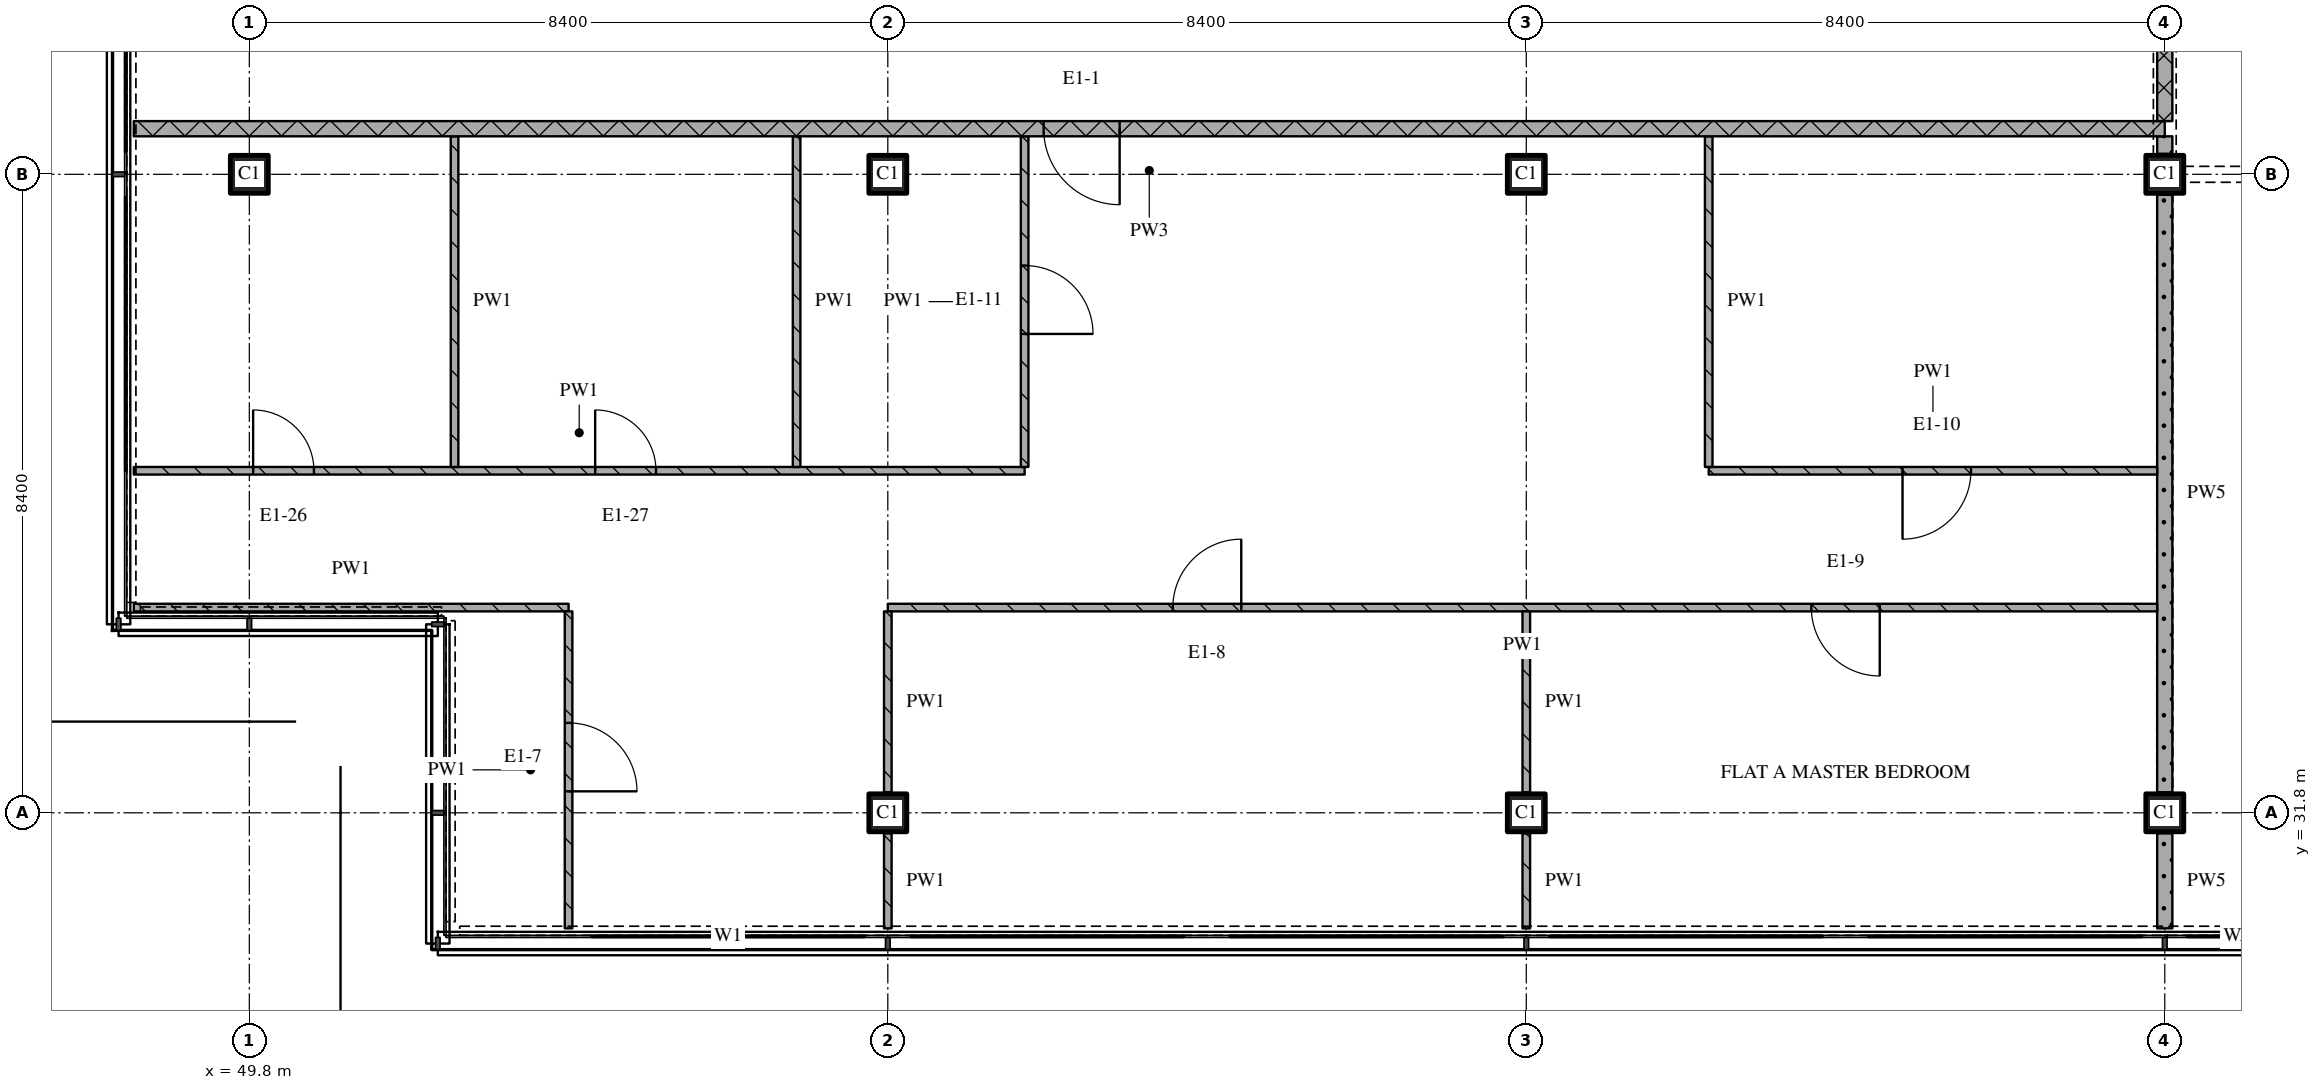
"""IFC4 building model, lengths in metres.
Left out: names, types, materials, properties, quantities, classifications, styles, units other than length and angle.
Written with IfcOpenShell. Run it as: python <this file> out.ifc"""

import sys

from ifc_helpers import new_model, si_unit, direction, frame, frame_2d, origin, origin_2d, place, context, subcontext, project, spatial, rectangle, extrude, element, fill, save


model = new_model("IFC4")
c1 = context("Model", 3, precision=1e-05, world=origin(), true_north=direction((0.0, 1.0)))
c2 = subcontext(c1, "Body", "Model", "MODEL_VIEW")
j1 = project(units=[si_unit("LENGTHUNIT", "METRE"), si_unit("PLANEANGLEUNIT", "RADIAN")], contexts=[c1])
p1 = place(None, origin())
s1 = spatial("IfcSite", under=j1, at=p1, CompositionType="ELEMENT")
p2 = place(p1, origin())
s2 = spatial("IfcBuilding", under=s1, at=p2, CompositionType="ELEMENT")
p3 = place(p2, frame((0.0, 0.0, 263.55)))
s3 = spatial("IfcBuildingStorey", under=s2, at=p3, CompositionType="ELEMENT", Elevation=263.55)
for number, where, z_axis, x_axis in (
    (1, (49.8, 40.2, 0.0), (0.0, 0.0, 1.0), (1.0, 0.0, 0.0)),
    (2, (58.2, 31.8, 0.0), (0.0, 0.0, 1.0), (1.0, 0.0, 0.0)),
    (3, (58.2, 40.2, 0.0), (0.0, 0.0, 1.0), (1.0, 0.0, 0.0)),
    (4, (66.6, 31.8, 0.0), (0.0, 0.0, 1.0), (1.0, 0.0, 0.0)),
    (5, (66.6, 40.2, 0.0), (0.0, 0.0, 1.0), (1.0, 0.0, 0.0)),
    (6, (75.0, 31.8, 0.0), (0.0, 0.0, 1.0), (1.0, 0.0, 0.0)),
    (7, (75.0, 40.2, 0.0), (0.0, 0.0, 1.0), (1.0, 0.0, 0.0)),
):
    element("IfcColumn", number, at=place(p3, frame(where, z_axis=z_axis, x_axis=x_axis)), inside=s3, PredefinedType="COLUMN", context=c2, shape_type="SweptSolid", body=[
        extrude(rectangle(XDim=0.5, YDim=0.5, at=origin_2d()), origin(), (0.0, 0.0, 1.0), 3.6),
    ])
p4 = place(p3, frame((48.28, 34.5, 0.0), z_axis=(0.0, 0.0, 1.0), x_axis=(1.0, 0.0, 0.0)))
e8 = element("IfcWall", 8, at=p4, inside=s3, PredefinedType="PARTITIONING", context=c2, shape_type="SweptSolid", body=[
    extrude(rectangle(XDim=5.72, YDim=0.1, at=frame_2d((2.86, 0.0))), origin(), (0.0, 0.0, 1.0), 3.32),
])
p5 = place(p3, frame((74.9, 34.5, 0.0), z_axis=(0.0, 0.0, 1.0), x_axis=(-1.0, 0.0, 0.0)))
e9 = element("IfcWall", 9, at=p5, inside=s3, PredefinedType="PARTITIONING", context=c2, shape_type="SweptSolid", body=[
    extrude(rectangle(XDim=16.7, YDim=0.1, at=frame_2d((8.35, 0.0))), origin(), (0.0, 0.0, 1.0), 3.32),
])
p6 = place(p5, frame((3.65, 0.0, 0.0)))
e10 = element("IfcOpeningElement", 10, at=p6, cuts=e9, PredefinedType="OPENING", context=c2, shape_type="SweptSolid", body=[
    extrude(rectangle(XDim=0.9, YDim=2.1, at=frame_2d((0.45, 1.05))), frame((0.0, 0.06, 0.0), z_axis=(0.0, -1.0, 0.0), x_axis=(1.0, 0.0, 0.0)), (0.0, 0.0, 1.0), 0.12),
])
p7 = place(p5, frame((12.05, 0.0, 0.0)))
e11 = element("IfcOpeningElement", 11, at=p7, cuts=e9, PredefinedType="OPENING", context=c2, shape_type="SweptSolid", body=[
    extrude(rectangle(XDim=0.9, YDim=2.1, at=frame_2d((0.45, 1.05))), frame((0.0, 0.06, 0.0), z_axis=(0.0, -1.0, 0.0), x_axis=(1.0, 0.0, 0.0)), (0.0, 0.0, 1.0), 0.12),
])
p8 = place(p3, frame((48.28, 36.3, 0.0), z_axis=(0.0, 0.0, 1.0), x_axis=(1.0, 0.0, 0.0)))
e12 = element("IfcWall", 12, at=p8, inside=s3, PredefinedType="PARTITIONING", context=c2, shape_type="SweptSolid", body=[
    extrude(rectangle(XDim=11.72, YDim=0.1, at=frame_2d((5.86, 0.0))), origin(), (0.0, 0.0, 1.0), 3.32),
])
p9 = place(p8, frame((1.57, 0.0, 0.0)))
e13 = element("IfcOpeningElement", 13, at=p9, cuts=e12, PredefinedType="OPENING", context=c2, shape_type="SweptSolid", body=[
    extrude(rectangle(XDim=0.8, YDim=2.1, at=frame_2d((0.4, 1.05))), frame((0.0, 0.06, 0.0), z_axis=(0.0, -1.0, 0.0), x_axis=(1.0, 0.0, 0.0)), (0.0, 0.0, 1.0), 0.12),
])
p10 = place(p8, frame((6.07, 0.0, 0.0)))
e14 = element("IfcOpeningElement", 14, at=p10, cuts=e12, PredefinedType="OPENING", context=c2, shape_type="SweptSolid", body=[
    extrude(rectangle(XDim=0.8, YDim=2.1, at=frame_2d((0.4, 1.05))), frame((0.0, 0.06, 0.0), z_axis=(0.0, -1.0, 0.0), x_axis=(1.0, 0.0, 0.0)), (0.0, 0.0, 1.0), 0.12),
])
p11 = place(p3, frame((69.0, 36.3, 0.0), z_axis=(0.0, 0.0, 1.0), x_axis=(1.0, 0.0, 0.0)))
e15 = element("IfcWall", 15, at=p11, inside=s3, PredefinedType="PARTITIONING", context=c2, shape_type="SweptSolid", body=[
    extrude(rectangle(XDim=5.9, YDim=0.1, at=frame_2d((2.95, 0.0))), origin(), (0.0, 0.0, 1.0), 3.32),
])
p12 = place(p11, frame((2.55, 0.0, 0.0)))
e16 = element("IfcOpeningElement", 16, at=p12, cuts=e15, PredefinedType="OPENING", context=c2, shape_type="SweptSolid", body=[
    extrude(rectangle(XDim=0.9, YDim=2.1, at=frame_2d((0.45, 1.05))), frame((0.0, 0.06, 0.0), z_axis=(0.0, -1.0, 0.0), x_axis=(1.0, 0.0, 0.0)), (0.0, 0.0, 1.0), 0.12),
])
p13 = place(p3, frame((75.0, 40.8, 0.0), z_axis=(0.0, 0.0, 1.0), x_axis=(-1.0, 0.0, 0.0)))
e17 = element("IfcWall", 17, at=p13, inside=s3, PredefinedType="PARTITIONING", context=c2, shape_type="SweptSolid", body=[
    extrude(rectangle(XDim=26.72, YDim=0.2, at=frame_2d((13.36, 0.0))), origin(), (0.0, 0.0, 1.0), 3.32),
])
p14 = place(p13, frame((13.75, 0.0, 0.0)))
e18 = element("IfcOpeningElement", 18, at=p14, cuts=e17, PredefinedType="OPENING", context=c2, shape_type="SweptSolid", body=[
    extrude(rectangle(XDim=1.0, YDim=2.1, at=frame_2d((0.5, 1.05))), frame((0.0, 0.11, 0.0), z_axis=(0.0, -1.0, 0.0), x_axis=(1.0, 0.0, 0.0)), (0.0, 0.0, 1.0), 0.22),
])
p15 = place(p3, frame((52.5, 40.7, 0.0), z_axis=(0.0, 0.0, 1.0), x_axis=(0.0, -1.0, 0.0)))
e19 = element("IfcWall", 19, at=p15, inside=s3, PredefinedType="PARTITIONING", context=c2, shape_type="SweptSolid", body=[
    extrude(rectangle(XDim=4.35, YDim=0.1, at=frame_2d((2.175, 0.0))), origin(), (0.0, 0.0, 1.0), 3.32),
])
p16 = place(p3, frame((54.0, 30.28, 0.0), z_axis=(0.0, 0.0, 1.0), x_axis=(0.0, 1.0, 0.0)))
e20 = element("IfcWall", 20, at=p16, inside=s3, PredefinedType="PARTITIONING", context=c2, shape_type="SweptSolid", body=[
    extrude(rectangle(XDim=4.17, YDim=0.1, at=frame_2d((2.085, 0.0))), origin(), (0.0, 0.0, 1.0), 3.32),
])
p17 = place(p16, frame((1.803, 0.0, 0.0)))
e21 = element("IfcOpeningElement", 21, at=p17, cuts=e20, PredefinedType="OPENING", context=c2, shape_type="SweptSolid", body=[
    extrude(rectangle(XDim=0.9, YDim=2.1, at=frame_2d((0.45, 1.05))), frame((0.0, 0.06, 0.0), z_axis=(0.0, -1.0, 0.0), x_axis=(1.0, 0.0, 0.0)), (0.0, 0.0, 1.0), 0.12),
])
p18 = place(p3, frame((57.0, 40.7, 0.0), z_axis=(0.0, 0.0, 1.0), x_axis=(0.0, -1.0, 0.0)))
e22 = element("IfcWall", 22, at=p18, inside=s3, PredefinedType="PARTITIONING", context=c2, shape_type="SweptSolid", body=[
    extrude(rectangle(XDim=4.35, YDim=0.1, at=frame_2d((2.175, 0.0))), origin(), (0.0, 0.0, 1.0), 3.32),
])
p19 = place(p3, frame((58.2, 31.53, 0.0), z_axis=(0.0, 0.0, 1.0), x_axis=(0.0, -1.0, 0.0)))
e23 = element("IfcWall", 23, at=p19, inside=s3, PredefinedType="PARTITIONING", context=c2, shape_type="SweptSolid", body=[
    extrude(rectangle(XDim=1.25, YDim=0.1, at=frame_2d((0.625, 0.0))), origin(), (0.0, 0.0, 1.0), 3.32),
])
p20 = place(p3, frame((58.2, 34.45, 0.0), z_axis=(0.0, 0.0, 1.0), x_axis=(0.0, -1.0, 0.0)))
e24 = element("IfcWall", 24, at=p20, inside=s3, PredefinedType="PARTITIONING", context=c2, shape_type="SweptSolid", body=[
    extrude(rectangle(XDim=2.38, YDim=0.1, at=frame_2d((1.19, 0.0))), origin(), (0.0, 0.0, 1.0), 3.32),
])
p21 = place(p3, frame((60.0, 36.35, 0.0), z_axis=(0.0, 0.0, 1.0), x_axis=(0.0, 1.0, 0.0)))
e25 = element("IfcWall", 25, at=p21, inside=s3, PredefinedType="PARTITIONING", context=c2, shape_type="SweptSolid", body=[
    extrude(rectangle(XDim=4.35, YDim=0.1, at=frame_2d((2.175, 0.0))), origin(), (0.0, 0.0, 1.0), 3.32),
])
p22 = place(p21, frame((1.75, 0.0, 0.0)))
e26 = element("IfcOpeningElement", 26, at=p22, cuts=e25, PredefinedType="OPENING", context=c2, shape_type="SweptSolid", body=[
    extrude(rectangle(XDim=0.9, YDim=2.1, at=frame_2d((0.45, 1.05))), frame((0.0, 0.06, 0.0), z_axis=(0.0, -1.0, 0.0), x_axis=(1.0, 0.0, 0.0)), (0.0, 0.0, 1.0), 0.12),
])
p23 = place(p3, frame((66.6, 31.53, 0.0), z_axis=(0.0, 0.0, 1.0), x_axis=(0.0, -1.0, 0.0)))
e27 = element("IfcWall", 27, at=p23, inside=s3, PredefinedType="PARTITIONING", context=c2, shape_type="SweptSolid", body=[
    extrude(rectangle(XDim=1.25, YDim=0.1, at=frame_2d((0.625, 0.0))), origin(), (0.0, 0.0, 1.0), 3.32),
])
p24 = place(p3, frame((66.6, 34.45, 0.0), z_axis=(0.0, 0.0, 1.0), x_axis=(0.0, -1.0, 0.0)))
e28 = element("IfcWall", 28, at=p24, inside=s3, PredefinedType="PARTITIONING", context=c2, shape_type="SweptSolid", body=[
    extrude(rectangle(XDim=2.38, YDim=0.1, at=frame_2d((1.19, 0.0))), origin(), (0.0, 0.0, 1.0), 3.32),
])
p25 = place(p3, frame((69.0, 40.7, 0.0), z_axis=(0.0, 0.0, 1.0), x_axis=(0.0, -1.0, 0.0)))
e29 = element("IfcWall", 29, at=p25, inside=s3, PredefinedType="PARTITIONING", context=c2, shape_type="SweptSolid", body=[
    extrude(rectangle(XDim=4.35, YDim=0.1, at=frame_2d((2.175, 0.0))), origin(), (0.0, 0.0, 1.0), 3.32),
])
p26 = place(p3, frame((75.0, 43.1, 0.0), z_axis=(0.0, 0.0, 1.0), x_axis=(0.0, -1.0, 0.0)))
e30 = element("IfcWall", 30, at=p26, inside=s3, PredefinedType="PARTITIONING", context=c2, shape_type="SweptSolid", body=[
    extrude(rectangle(XDim=2.2, YDim=0.2, at=frame_2d((1.1, 0.0))), origin(), (0.0, 0.0, 1.0), 2.53),
])
p27 = place(p3, frame((75.0, 31.53, 0.0), z_axis=(0.0, 0.0, 1.0), x_axis=(0.0, -1.0, 0.0)))
e31 = element("IfcWall", 31, at=p27, inside=s3, PredefinedType="PARTITIONING", context=c2, shape_type="SweptSolid", body=[
    extrude(rectangle(XDim=1.25, YDim=0.2, at=frame_2d((0.625, 0.0))), origin(), (0.0, 0.0, 1.0), 3.32),
])
p28 = place(p3, frame((75.0, 39.93, 0.0), z_axis=(0.0, 0.0, 1.0), x_axis=(0.0, -1.0, 0.0)))
e32 = element("IfcWall", 32, at=p28, inside=s3, PredefinedType="PARTITIONING", context=c2, shape_type="SweptSolid", body=[
    extrude(rectangle(XDim=7.86, YDim=0.2, at=frame_2d((3.93, 0.0))), origin(), (0.0, 0.0, 1.0), 2.77),
])
p29 = place(p3, frame((75.0, 40.7, 0.0), z_axis=(0.0, 0.0, 1.0), x_axis=(0.0, -1.0, 0.0)))
e33 = element("IfcWall", 33, at=p29, inside=s3, PredefinedType="PARTITIONING", context=c2, shape_type="SweptSolid", body=[
    extrude(rectangle(XDim=0.23, YDim=0.2, at=frame_2d((0.115, 0.0))), origin(), (0.0, 0.0, 1.0), 3.32),
])
p30 = place(p6, origin())
e34 = element("IfcDoor", 34, at=p30, inside=s3, OperationType="SINGLE_SWING_LEFT", PredefinedType="DOOR", context=c2, shape_type="SweptSolid", body=[
    extrude(rectangle(XDim=0.9, YDim=2.1, at=frame_2d((0.45, 1.05))), frame((0.0, 0.025, 0.0), z_axis=(0.0, -1.0, 0.0), x_axis=(1.0, 0.0, 0.0)), (0.0, 0.0, 1.0), 0.05),
])
fill(e10, e34)
p31 = place(p7, origin())
e35 = element("IfcDoor", 35, at=p31, inside=s3, OperationType="SINGLE_SWING_RIGHT", PredefinedType="DOOR", context=c2, shape_type="SweptSolid", body=[
    extrude(rectangle(XDim=0.9, YDim=2.1, at=frame_2d((0.45, 1.05))), frame((0.0, 0.025, 0.0), z_axis=(0.0, -1.0, 0.0), x_axis=(1.0, 0.0, 0.0)), (0.0, 0.0, 1.0), 0.05),
])
fill(e11, e35)
p32 = place(p9, origin())
e36 = element("IfcDoor", 36, at=p32, inside=s3, OperationType="SINGLE_SWING_LEFT", PredefinedType="DOOR", context=c2, shape_type="SweptSolid", body=[
    extrude(rectangle(XDim=0.8, YDim=2.1, at=frame_2d((0.4, 1.05))), frame((0.0, 0.025, 0.0), z_axis=(0.0, -1.0, 0.0), x_axis=(1.0, 0.0, 0.0)), (0.0, 0.0, 1.0), 0.05),
])
fill(e13, e36)
p33 = place(p10, origin())
e37 = element("IfcDoor", 37, at=p33, inside=s3, OperationType="SINGLE_SWING_LEFT", PredefinedType="DOOR", context=c2, shape_type="SweptSolid", body=[
    extrude(rectangle(XDim=0.8, YDim=2.1, at=frame_2d((0.4, 1.05))), frame((0.0, 0.025, 0.0), z_axis=(0.0, -1.0, 0.0), x_axis=(1.0, 0.0, 0.0)), (0.0, 0.0, 1.0), 0.05),
])
fill(e14, e37)
p34 = place(p12, origin())
e38 = element("IfcDoor", 38, at=p34, inside=s3, OperationType="SINGLE_SWING_RIGHT", PredefinedType="DOOR", context=c2, shape_type="SweptSolid", body=[
    extrude(rectangle(XDim=0.9, YDim=2.1, at=frame_2d((0.45, 1.05))), frame((0.0, 0.025, 0.0), z_axis=(0.0, -1.0, 0.0), x_axis=(1.0, 0.0, 0.0)), (0.0, 0.0, 1.0), 0.05),
])
fill(e16, e38)
p35 = place(p14, origin())
e39 = element("IfcDoor", 39, at=p35, inside=s3, OperationType="SINGLE_SWING_LEFT", PredefinedType="DOOR", context=c2, shape_type="SweptSolid", body=[
    extrude(rectangle(XDim=1.0, YDim=2.1, at=frame_2d((0.5, 1.05))), frame((0.0, 0.025, 0.0), z_axis=(0.0, -1.0, 0.0), x_axis=(1.0, 0.0, 0.0)), (0.0, 0.0, 1.0), 0.05),
])
fill(e18, e39)
p36 = place(p17, origin())
e40 = element("IfcDoor", 40, at=p36, inside=s3, OperationType="SINGLE_SWING_RIGHT", PredefinedType="DOOR", context=c2, shape_type="SweptSolid", body=[
    extrude(rectangle(XDim=0.9, YDim=2.1, at=frame_2d((0.45, 1.05))), frame((0.0, 0.025, 0.0), z_axis=(0.0, -1.0, 0.0), x_axis=(1.0, 0.0, 0.0)), (0.0, 0.0, 1.0), 0.05),
])
fill(e21, e40)
p37 = place(p22, origin())
e41 = element("IfcDoor", 41, at=p37, inside=s3, OperationType="SINGLE_SWING_RIGHT", PredefinedType="DOOR", context=c2, shape_type="SweptSolid", body=[
    extrude(rectangle(XDim=0.9, YDim=2.1, at=frame_2d((0.45, 1.05))), frame((0.0, 0.025, 0.0), z_axis=(0.0, -1.0, 0.0), x_axis=(1.0, 0.0, 0.0)), (0.0, 0.0, 1.0), 0.05),
])
fill(e26, e41)
save(model, sys.argv[1])
